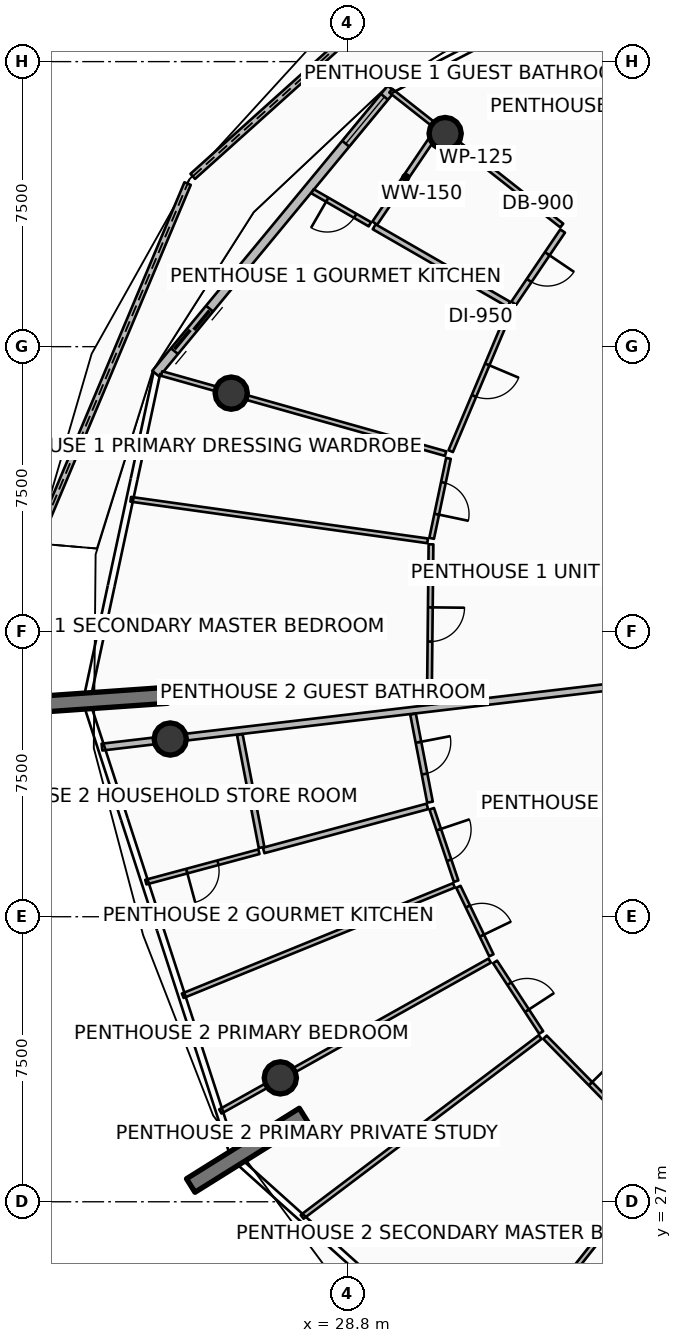
"""IFC4 building model, lengths in metres.
Left out: names, types, materials, properties, quantities, classifications, styles, units other than length and angle.
Written with IfcOpenShell. Run it as: python <this file> out.ifc"""

import sys

from ifc_helpers import new_model, si_unit, direction, frame, frame_2d, origin, origin_2d, place, context, subcontext, project, spatial, polyline, rectangle, circle, outline, extrude, element, fill, save


model = new_model("IFC4")
c1 = context("Model", 3, precision=1e-05, world=origin(), true_north=direction((0.0, 1.0)))
c2 = subcontext(c1, "Body", "Model", "MODEL_VIEW")
j1 = project(units=[si_unit("LENGTHUNIT", "METRE"), si_unit("PLANEANGLEUNIT", "RADIAN")], contexts=[c1])
p1 = place(None, origin())
s1 = spatial("IfcSite", under=j1, at=p1, CompositionType="ELEMENT")
p2 = place(p1, origin())
s2 = spatial("IfcBuilding", under=s1, at=p2, CompositionType="ELEMENT")
p3 = place(p2, frame((0.0, 0.0, 338.9)))
s3 = spatial("IfcBuildingStorey", under=s2, at=p3, CompositionType="ELEMENT", Elevation=338.9)
for number, where, z_axis, x_axis in (
    (1, (24.059, 40.326, 0.0), (0.0, 0.0, 1.0), (-0.998, -0.07, 0.0)),
    (2, (27.647, 29.282, 0.0), (0.0, 0.0, 1.0), (-0.848, -0.53, 0.0)),
):
    element("IfcWall", number, at=place(p3, frame(where, z_axis=z_axis, x_axis=x_axis)), inside=s3, PredefinedType="SOLIDWALL", context=c2, shape_type="SweptSolid", body=[
        extrude(rectangle(XDim=3.5, YDim=0.42, at=frame_2d((1.75, 0.0))), origin(), (0.0, 0.0, 1.0), 4.2),
    ])
for number, where, z_axis, x_axis in (
    (3, (31.374, 55.107, 0.0), (0.0, 0.0, 1.0), (1.0, 0.0, 0.0)),
    (4, (25.744, 48.277, 0.0), (0.0, 0.0, 1.0), (1.0, 0.0, 0.0)),
    (5, (24.14, 39.176, 0.0), (0.0, 0.0, 1.0), (1.0, 0.0, 0.0)),
    (6, (27.037, 30.26, 0.0), (0.0, 0.0, 1.0), (1.0, 0.0, 0.0)),
):
    element("IfcColumn", number, at=place(p3, frame(where, z_axis=z_axis, x_axis=x_axis)), inside=s3, PredefinedType="COLUMN", context=c2, shape_type="SweptSolid", body=[
        extrude(circle(Radius=0.425, at=origin_2d()), origin(), (0.0, 0.0, 1.0), 3.8),
    ])
p4 = place(p3, frame((31.997, 60.507, 0.0), z_axis=(0.0, 0.0, 1.0), x_axis=(-0.74390919155, -0.668280715514, 0.0)))
e7 = element("IfcWall", 7, at=p4, inside=s3, PredefinedType="PARAPET", context=c2, shape_type="SweptSolid", body=[
    extrude(outline(polyline([(0.0, 0.0), (9.765, 0.0), (9.765, 1.348), (4.883, 1.562), (0.0, 1.747), (0.0, 0.0)])), frame((0.0, 0.09, 0.0), z_axis=(0.0, -1.0, 0.0), x_axis=(1.0, 0.0, 0.0)), (0.0, 0.0, 1.0), 0.18),
])
p5 = place(p3, frame((24.597, 53.79, 0.0), z_axis=(0.0, 0.0, 1.0), x_axis=(-0.38743619069, -0.921896522471, 0.0)))
e8 = element("IfcWall", 8, at=p5, inside=s3, PredefinedType="PARAPET", context=c2, shape_type="SweptSolid", body=[
    extrude(outline(polyline([(0.0, 0.0), (10.269, 0.0), (10.269, 1.12), (5.135, 1.182), (0.0, 1.348), (0.0, 0.0)])), frame((0.0, 0.09, 0.0), z_axis=(0.0, -1.0, 0.0), x_axis=(1.0, 0.0, 0.0)), (0.0, 0.0, 1.0), 0.18),
])
p6 = place(p3, frame((29.955, 56.289, 0.0), z_axis=(0.0, 0.0, 1.0), x_axis=(-0.636803612721, -0.771026042897, 0.0)))
e9 = element("IfcWall", 9, at=p6, inside=s3, PredefinedType="SOLIDWALL", context=c2, shape_type="SweptSolid", body=[
    extrude(rectangle(XDim=9.728, YDim=0.24, at=frame_2d((4.864, 0.0))), origin(), (0.0, 0.0, 1.0), 2.75),
])
p7 = place(p6, frame((7.508, 0.0, 0.0)))
e10 = element("IfcOpeningElement", 10, at=p7, cuts=e9, PredefinedType="OPENING", context=c2, shape_type="SweptSolid", body=[
    extrude(rectangle(XDim=1.45, YDim=2.15, at=frame_2d((0.725, 1.075))), frame((0.0, 0.13, 0.0), z_axis=(0.0, -1.0, 0.0), x_axis=(1.0, 0.0, 0.0)), (0.0, 0.0, 1.0), 0.26),
])
p8 = place(p6, frame((0.28, 0.0, 0.65)))
e11 = element("IfcOpeningElement", 11, at=p8, cuts=e9, PredefinedType="OPENING", context=c2, shape_type="SweptSolid", body=[
    extrude(rectangle(XDim=1.6, YDim=1.5, at=frame_2d((0.8, 0.75))), frame((0.0, 0.13, 0.0), z_axis=(0.0, -1.0, 0.0), x_axis=(1.0, 0.0, 0.0)), (0.0, 0.0, 1.0), 0.26),
])
p9 = place(p3, frame((37.191, 40.721, 0.0), z_axis=(0.0, 0.0, 1.0), x_axis=(-0.993068548333, -0.117536625409, 0.0)))
e12 = element("IfcWall", 12, at=p9, inside=s3, PredefinedType="PARTITIONING", context=c2, shape_type="SweptSolid", body=[
    extrude(rectangle(XDim=14.951, YDim=0.18, at=frame_2d((7.476, 0.0))), origin(), (0.0, 0.0, 1.0), 3.24),
])
p10 = place(p3, frame((34.443, 52.688, 0.0), z_axis=(0.0, 0.0, 1.0), x_axis=(-0.785329715116, 0.61907773224, 0.0)))
e13 = element("IfcWall", 13, at=p10, inside=s3, PredefinedType="PARTITIONING", context=c2, shape_type="SweptSolid", body=[
    extrude(rectangle(XDim=5.73, YDim=0.125, at=frame_2d((2.865, 0.0))), origin(), (0.0, 0.0, 1.0), 3.24),
])
p11 = place(p3, frame((34.466, 52.543, 0.0), z_axis=(0.0, 0.0, 1.0), x_axis=(-0.560627016922, -0.828068443969, 0.0)))
e14 = element("IfcWall", 14, at=p11, inside=s3, PredefinedType="PARTITIONING", context=c2, shape_type="SweptSolid", body=[
    extrude(rectangle(XDim=2.295, YDim=0.15, at=frame_2d((1.147, 0.0))), origin(), (0.0, 0.0, 1.0), 3.24),
])
p12 = place(p11, frame((0.722, 0.0, 0.0)))
e15 = element("IfcOpeningElement", 15, at=p12, cuts=e14, PredefinedType="OPENING", context=c2, shape_type="SweptSolid", body=[
    extrude(rectangle(XDim=0.85, YDim=2.06, at=frame_2d((0.425, 1.03))), frame((0.0, 0.085, 0.0), z_axis=(0.0, -1.0, 0.0), x_axis=(1.0, 0.0, 0.0)), (0.0, 0.0, 1.0), 0.17),
])
p13 = place(p3, frame((31.152, 55.155, 0.0), z_axis=(0.0, 0.0, 1.0), x_axis=(-0.560638207203, -0.828060867705, 0.0)))
e16 = element("IfcWall", 16, at=p13, inside=s3, PredefinedType="PARTITIONING", context=c2, shape_type="SweptSolid", body=[
    extrude(rectangle(XDim=2.906, YDim=0.15, at=frame_2d((1.453, 0.0))), origin(), (0.0, 0.0, 1.0), 3.24),
])
p14 = place(p3, frame((33.051, 50.613, 0.0), z_axis=(0.0, 0.0, 1.0), x_axis=(-0.866485544891, 0.499202163952, 0.0)))
e17 = element("IfcWall", 17, at=p14, inside=s3, PredefinedType="PARTITIONING", context=c2, shape_type="SweptSolid", body=[
    extrude(rectangle(XDim=4.09, YDim=0.15, at=frame_2d((2.045, 0.0))), origin(), (0.0, 0.0, 1.0), 3.24),
])
p15 = place(p3, frame((29.394, 52.719, 0.0), z_axis=(0.0, 0.0, 1.0), x_axis=(-0.866486493133, 0.499200518047, 0.0)))
e18 = element("IfcWall", 18, at=p15, inside=s3, PredefinedType="PARTITIONING", context=c2, shape_type="SweptSolid", body=[
    extrude(rectangle(XDim=1.741, YDim=0.125, at=frame_2d((0.871, 0.0))), origin(), (0.0, 0.0, 1.0), 3.24),
])
p16 = place(p15, frame((0.446, 0.0, 0.0)))
e19 = element("IfcOpeningElement", 19, at=p16, cuts=e18, PredefinedType="OPENING", context=c2, shape_type="SweptSolid", body=[
    extrude(rectangle(XDim=0.85, YDim=2.06, at=frame_2d((0.425, 1.03))), frame((0.0, 0.073, 0.0), z_axis=(0.0, -1.0, 0.0), x_axis=(1.0, 0.0, 0.0)), (0.0, 0.0, 1.0), 0.145),
])
p17 = place(p3, frame((33.094, 50.485, 0.0), z_axis=(0.0, 0.0, 1.0), x_axis=(-0.388261704365, -0.921549157085, 0.0)))
e20 = element("IfcWall", 20, at=p17, inside=s3, PredefinedType="PARTITIONING", context=c2, shape_type="SweptSolid", body=[
    extrude(rectangle(XDim=4.052, YDim=0.125, at=frame_2d((2.026, 0.0))), origin(), (0.0, 0.0, 1.0), 3.24),
])
p18 = place(p17, frame((1.576, 0.0, 0.0)))
e21 = element("IfcOpeningElement", 21, at=p18, cuts=e20, PredefinedType="OPENING", context=c2, shape_type="SweptSolid", body=[
    extrude(rectangle(XDim=0.9, YDim=2.08, at=frame_2d((0.45, 1.04))), frame((0.0, 0.073, 0.0), z_axis=(0.0, -1.0, 0.0), x_axis=(1.0, 0.0, 0.0)), (0.0, 0.0, 1.0), 0.145),
])
p19 = place(p3, frame((31.385, 46.686, 0.0), z_axis=(0.0, 0.0, 1.0), x_axis=(-0.962455784847, 0.271438505401, 0.0)))
e22 = element("IfcWall", 22, at=p19, inside=s3, PredefinedType="PARTITIONING", context=c2, shape_type="SweptSolid", body=[
    extrude(rectangle(XDim=7.764, YDim=0.125, at=frame_2d((3.882, 0.0))), origin(), (0.0, 0.0, 1.0), 3.24),
])
p20 = place(p3, frame((30.914, 44.391, 0.0), z_axis=(0.0, 0.0, 1.0), x_axis=(-0.990350838179, 0.138582889702, 0.0)))
e23 = element("IfcWall", 23, at=p20, inside=s3, PredefinedType="PARTITIONING", context=c2, shape_type="SweptSolid", body=[
    extrude(rectangle(XDim=7.889, YDim=0.125, at=frame_2d((3.944, 0.0))), origin(), (0.0, 0.0, 1.0), 3.24),
])
p21 = place(p3, frame((31.461, 46.561, 0.0), z_axis=(0.0, 0.0, 1.0), x_axis=(-0.205518321788, -0.978653268226, 0.0)))
e24 = element("IfcWall", 24, at=p21, inside=s3, PredefinedType="PARTITIONING", context=c2, shape_type="SweptSolid", body=[
    extrude(rectangle(XDim=2.15, YDim=0.125, at=frame_2d((1.075, 0.0))), origin(), (0.0, 0.0, 1.0), 3.24),
])
p22 = place(p21, frame((0.65, 0.0, 0.0)))
e25 = element("IfcOpeningElement", 25, at=p22, cuts=e24, PredefinedType="OPENING", context=c2, shape_type="SweptSolid", body=[
    extrude(rectangle(XDim=0.85, YDim=2.06, at=frame_2d((0.425, 1.03))), frame((0.0, 0.073, 0.0), z_axis=(0.0, -1.0, 0.0), x_axis=(1.0, 0.0, 0.0)), (0.0, 0.0, 1.0), 0.145),
])
p23 = place(p3, frame((31.002, 44.298, 0.0), z_axis=(0.0, 0.0, 1.0), x_axis=(-0.010598269554, -0.999943836764, 0.0)))
e26 = element("IfcWall", 26, at=p23, inside=s3, PredefinedType="PARTITIONING", context=c2, shape_type="SweptSolid", body=[
    extrude(rectangle(XDim=4.216, YDim=0.125, at=frame_2d((2.108, 0.0))), origin(), (0.0, 0.0, 1.0), 3.24),
])
p24 = place(p23, frame((1.658, 0.0, 0.0)))
e27 = element("IfcOpeningElement", 27, at=p24, cuts=e26, PredefinedType="OPENING", context=c2, shape_type="SweptSolid", body=[
    extrude(rectangle(XDim=0.9, YDim=2.08, at=frame_2d((0.45, 1.04))), frame((0.0, 0.073, 0.0), z_axis=(0.0, -1.0, 0.0), x_axis=(1.0, 0.0, 0.0)), (0.0, 0.0, 1.0), 0.145),
])
p25 = place(p3, frame((30.529, 39.832, 0.0), z_axis=(0.0, 0.0, 1.0), x_axis=(0.189108301743, -0.981956236404, 0.0)))
e28 = element("IfcWall", 28, at=p25, inside=s3, PredefinedType="PARTITIONING", context=c2, shape_type="SweptSolid", body=[
    extrude(rectangle(XDim=2.36, YDim=0.15, at=frame_2d((1.18, 0.0))), origin(), (0.0, 0.0, 1.0), 3.24),
])
p26 = place(p25, frame((0.755, 0.0, 0.0)))
e29 = element("IfcOpeningElement", 29, at=p26, cuts=e28, PredefinedType="OPENING", context=c2, shape_type="SweptSolid", body=[
    extrude(rectangle(XDim=0.85, YDim=2.06, at=frame_2d((0.425, 1.03))), frame((0.0, 0.085, 0.0), z_axis=(0.0, -1.0, 0.0), x_axis=(1.0, 0.0, 0.0)), (0.0, 0.0, 1.0), 0.17),
])
p27 = place(p3, frame((25.971, 39.292, 0.0), z_axis=(0.0, 0.0, 1.0), x_axis=(0.189140808358, -0.981949975617, 0.0)))
e30 = element("IfcWall", 30, at=p27, inside=s3, PredefinedType="PARTITIONING", context=c2, shape_type="SweptSolid", body=[
    extrude(rectangle(XDim=3.024, YDim=0.15, at=frame_2d((1.512, 0.0))), origin(), (0.0, 0.0, 1.0), 3.24),
])
p28 = place(p3, frame((30.906, 37.403, 0.0), z_axis=(0.0, 0.0, 1.0), x_axis=(-0.96569498994, -0.259679006477, 0.0)))
e31 = element("IfcWall", 31, at=p28, inside=s3, PredefinedType="PARTITIONING", context=c2, shape_type="SweptSolid", body=[
    extrude(rectangle(XDim=4.46, YDim=0.15, at=frame_2d((2.23, 0.0))), origin(), (0.0, 0.0, 1.0), 3.24),
])
p29 = place(p3, frame((26.473, 36.211, 0.0), z_axis=(0.0, 0.0, 1.0), x_axis=(-0.965686885268, -0.259709144278, 0.0)))
e32 = element("IfcWall", 32, at=p29, inside=s3, PredefinedType="PARTITIONING", context=c2, shape_type="SweptSolid", body=[
    extrude(rectangle(XDim=3.081, YDim=0.125, at=frame_2d((1.54, 0.0))), origin(), (0.0, 0.0, 1.0), 3.24),
])
p30 = place(p29, frame((1.115, 0.0, 0.0)))
e33 = element("IfcOpeningElement", 33, at=p30, cuts=e32, PredefinedType="OPENING", context=c2, shape_type="SweptSolid", body=[
    extrude(rectangle(XDim=0.85, YDim=2.06, at=frame_2d((0.425, 1.03))), frame((0.0, 0.073, 0.0), z_axis=(0.0, -1.0, 0.0), x_axis=(1.0, 0.0, 0.0)), (0.0, 0.0, 1.0), 0.145),
])
p31 = place(p3, frame((31.604, 35.325, 0.0), z_axis=(0.0, 0.0, 1.0), x_axis=(-0.926197317487, -0.377039161202, 0.0)))
e34 = element("IfcWall", 34, at=p31, inside=s3, PredefinedType="PARTITIONING", context=c2, shape_type="SweptSolid", body=[
    extrude(rectangle(XDim=7.704, YDim=0.125, at=frame_2d((3.852, 0.0))), origin(), (0.0, 0.0, 1.0), 3.24),
])
p32 = place(p3, frame((31.021, 37.341, 0.0), z_axis=(0.0, 0.0, 1.0), x_axis=(0.318958301795, -0.947768749071, 0.0)))
e35 = element("IfcWall", 35, at=p32, inside=s3, PredefinedType="PARTITIONING", context=c2, shape_type="SweptSolid", body=[
    extrude(rectangle(XDim=2.011, YDim=0.125, at=frame_2d((1.005, 0.0))), origin(), (0.0, 0.0, 1.0), 3.24),
])
p33 = place(p32, frame((0.58, 0.0, 0.0)))
e36 = element("IfcOpeningElement", 36, at=p33, cuts=e35, PredefinedType="OPENING", context=c2, shape_type="SweptSolid", body=[
    extrude(rectangle(XDim=0.85, YDim=2.06, at=frame_2d((0.425, 1.03))), frame((0.0, 0.073, 0.0), z_axis=(0.0, -1.0, 0.0), x_axis=(1.0, 0.0, 0.0)), (0.0, 0.0, 1.0), 0.145),
])
p34 = place(p3, frame((31.723, 35.287, 0.0), z_axis=(0.0, 0.0, 1.0), x_axis=(0.433639468752, -0.901086461523, 0.0)))
e37 = element("IfcWall", 37, at=p34, inside=s3, PredefinedType="PARTITIONING", context=c2, shape_type="SweptSolid", body=[
    extrude(rectangle(XDim=2.0, YDim=0.125, at=frame_2d((1.0, 0.0))), origin(), (0.0, 0.0, 1.0), 3.24),
])
p35 = place(p34, frame((0.575, 0.0, 0.0)))
e38 = element("IfcOpeningElement", 38, at=p35, cuts=e37, PredefinedType="OPENING", context=c2, shape_type="SweptSolid", body=[
    extrude(rectangle(XDim=0.85, YDim=2.06, at=frame_2d((0.425, 1.03))), frame((0.0, 0.073, 0.0), z_axis=(0.0, -1.0, 0.0), x_axis=(1.0, 0.0, 0.0)), (0.0, 0.0, 1.0), 0.145),
])
p36 = place(p3, frame((32.546, 33.345, 0.0), z_axis=(0.0, 0.0, 1.0), x_axis=(-0.87250499099, -0.488605199212, 0.0)))
e39 = element("IfcWall", 39, at=p36, inside=s3, PredefinedType="PARTITIONING", context=c2, shape_type="SweptSolid", body=[
    extrude(rectangle(XDim=8.124, YDim=0.125, at=frame_2d((4.062, 0.0))), origin(), (0.0, 0.0, 1.0), 3.24),
])
p37 = place(p3, frame((37.035, 28.091, 0.0), z_axis=(0.0, 0.0, 1.0), x_axis=(-0.619085814128, -0.785323344072, 0.0)))
e40 = element("IfcWall", 40, at=p37, inside=s3, PredefinedType="PARTITIONING", context=c2, shape_type="SweptSolid", body=[
    extrude(rectangle(XDim=7.415, YDim=0.125, at=frame_2d((3.708, 0.0))), origin(), (0.0, 0.0, 1.0), 3.24),
])
p38 = place(p3, frame((33.873, 31.333, 0.0), z_axis=(0.0, 0.0, 1.0), x_axis=(-0.798020912915, -0.602629755779, 0.0)))
e41 = element("IfcWall", 41, at=p38, inside=s3, PredefinedType="PARTITIONING", context=c2, shape_type="SweptSolid", body=[
    extrude(rectangle(XDim=7.848, YDim=0.125, at=frame_2d((3.924, 0.0))), origin(), (0.0, 0.0, 1.0), 3.24),
])
p39 = place(p3, frame((32.688, 33.311, 0.0), z_axis=(0.0, 0.0, 1.0), x_axis=(0.546878647358, -0.837211887794, 0.0)))
e42 = element("IfcWall", 42, at=p39, inside=s3, PredefinedType="PARTITIONING", context=c2, shape_type="SweptSolid", body=[
    extrude(rectangle(XDim=2.218, YDim=0.125, at=frame_2d((1.109, 0.0))), origin(), (0.0, 0.0, 1.0), 3.24),
])
p40 = place(p39, frame((0.684, 0.0, 0.0)))
e43 = element("IfcOpeningElement", 43, at=p40, cuts=e42, PredefinedType="OPENING", context=c2, shape_type="SweptSolid", body=[
    extrude(rectangle(XDim=0.85, YDim=2.06, at=frame_2d((0.425, 1.03))), frame((0.0, 0.073, 0.0), z_axis=(0.0, -1.0, 0.0), x_axis=(1.0, 0.0, 0.0)), (0.0, 0.0, 1.0), 0.145),
])
p41 = place(p3, frame((34.001, 31.33, 0.0), z_axis=(0.0, 0.0, 1.0), x_axis=(0.699699856998, -0.714436918221, 0.0)))
e44 = element("IfcWall", 44, at=p41, inside=s3, PredefinedType="PARTITIONING", context=c2, shape_type="SweptSolid", body=[
    extrude(rectangle(XDim=4.324, YDim=0.125, at=frame_2d((2.162, 0.0))), origin(), (0.0, 0.0, 1.0), 3.24),
])
p42 = place(p41, frame((1.712, 0.0, 0.0)))
e45 = element("IfcOpeningElement", 45, at=p42, cuts=e44, PredefinedType="OPENING", context=c2, shape_type="SweptSolid", body=[
    extrude(rectangle(XDim=0.9, YDim=2.08, at=frame_2d((0.45, 1.04))), frame((0.0, 0.073, 0.0), z_axis=(0.0, -1.0, 0.0), x_axis=(1.0, 0.0, 0.0)), (0.0, 0.0, 1.0), 0.145),
])
p43 = place(p7, origin())
e46 = element("IfcDoor", 46, at=p43, inside=s3, OperationType="DOUBLE_DOOR_SLIDING", PredefinedType="DOOR", context=c2, shape_type="SweptSolid", body=[
    extrude(rectangle(XDim=1.45, YDim=2.15, at=frame_2d((0.725, 1.075))), frame((0.0, 0.025, 0.0), z_axis=(0.0, -1.0, 0.0), x_axis=(1.0, 0.0, 0.0)), (0.0, 0.0, 1.0), 0.05),
])
fill(e10, e46)
p44 = place(p8, origin())
e47 = element("IfcWindow", 47, at=p44, inside=s3, PartitioningType="SINGLE_PANEL", PredefinedType="WINDOW", context=c2, shape_type="SweptSolid", body=[
    extrude(rectangle(XDim=1.6, YDim=1.5, at=frame_2d((0.8, 0.75))), frame((0.0, 0.03, 0.0), z_axis=(0.0, -1.0, 0.0), x_axis=(1.0, 0.0, 0.0)), (0.0, 0.0, 1.0), 0.06),
])
fill(e11, e47)
p45 = place(p12, origin())
e48 = element("IfcDoor", 48, at=p45, inside=s3, OperationType="SINGLE_SWING_LEFT", PredefinedType="DOOR", context=c2, shape_type="SweptSolid", body=[
    extrude(rectangle(XDim=0.85, YDim=2.06, at=frame_2d((0.425, 1.03))), frame((0.0, 0.025, 0.0), z_axis=(0.0, -1.0, 0.0), x_axis=(1.0, 0.0, 0.0)), (0.0, 0.0, 1.0), 0.05),
])
fill(e15, e48)
p46 = place(p16, origin())
e49 = element("IfcDoor", 49, at=p46, inside=s3, OperationType="SINGLE_SWING_RIGHT", PredefinedType="DOOR", context=c2, shape_type="SweptSolid", body=[
    extrude(rectangle(XDim=0.85, YDim=2.06, at=frame_2d((0.425, 1.03))), frame((0.0, 0.025, 0.0), z_axis=(0.0, -1.0, 0.0), x_axis=(1.0, 0.0, 0.0)), (0.0, 0.0, 1.0), 0.05),
])
fill(e19, e49)
p47 = place(p18, origin())
e50 = element("IfcDoor", 50, at=p47, inside=s3, OperationType="SINGLE_SWING_LEFT", PredefinedType="DOOR", context=c2, shape_type="SweptSolid", body=[
    extrude(rectangle(XDim=0.9, YDim=2.08, at=frame_2d((0.45, 1.04))), frame((0.0, 0.025, 0.0), z_axis=(0.0, -1.0, 0.0), x_axis=(1.0, 0.0, 0.0)), (0.0, 0.0, 1.0), 0.05),
])
fill(e21, e50)
p48 = place(p22, origin())
e51 = element("IfcDoor", 51, at=p48, inside=s3, OperationType="SINGLE_SWING_RIGHT", PredefinedType="DOOR", context=c2, shape_type="SweptSolid", body=[
    extrude(rectangle(XDim=0.85, YDim=2.06, at=frame_2d((0.425, 1.03))), frame((0.0, 0.025, 0.0), z_axis=(0.0, -1.0, 0.0), x_axis=(1.0, 0.0, 0.0)), (0.0, 0.0, 1.0), 0.05),
])
fill(e25, e51)
p49 = place(p24, origin())
e52 = element("IfcDoor", 52, at=p49, inside=s3, OperationType="SINGLE_SWING_LEFT", PredefinedType="DOOR", context=c2, shape_type="SweptSolid", body=[
    extrude(rectangle(XDim=0.9, YDim=2.08, at=frame_2d((0.45, 1.04))), frame((0.0, 0.025, 0.0), z_axis=(0.0, -1.0, 0.0), x_axis=(1.0, 0.0, 0.0)), (0.0, 0.0, 1.0), 0.05),
])
fill(e27, e52)
p50 = place(p26, origin())
e53 = element("IfcDoor", 53, at=p50, inside=s3, OperationType="SINGLE_SWING_LEFT", PredefinedType="DOOR", context=c2, shape_type="SweptSolid", body=[
    extrude(rectangle(XDim=0.85, YDim=2.06, at=frame_2d((0.425, 1.03))), frame((0.0, 0.025, 0.0), z_axis=(0.0, -1.0, 0.0), x_axis=(1.0, 0.0, 0.0)), (0.0, 0.0, 1.0), 0.05),
])
fill(e29, e53)
p51 = place(p30, origin())
e54 = element("IfcDoor", 54, at=p51, inside=s3, OperationType="SINGLE_SWING_RIGHT", PredefinedType="DOOR", context=c2, shape_type="SweptSolid", body=[
    extrude(rectangle(XDim=0.85, YDim=2.06, at=frame_2d((0.425, 1.03))), frame((0.0, 0.025, 0.0), z_axis=(0.0, -1.0, 0.0), x_axis=(1.0, 0.0, 0.0)), (0.0, 0.0, 1.0), 0.05),
])
fill(e33, e54)
p52 = place(p33, origin())
e55 = element("IfcDoor", 55, at=p52, inside=s3, OperationType="SINGLE_SWING_LEFT", PredefinedType="DOOR", context=c2, shape_type="SweptSolid", body=[
    extrude(rectangle(XDim=0.85, YDim=2.06, at=frame_2d((0.425, 1.03))), frame((0.0, 0.025, 0.0), z_axis=(0.0, -1.0, 0.0), x_axis=(1.0, 0.0, 0.0)), (0.0, 0.0, 1.0), 0.05),
])
fill(e36, e55)
p53 = place(p35, origin())
e56 = element("IfcDoor", 56, at=p53, inside=s3, OperationType="SINGLE_SWING_RIGHT", PredefinedType="DOOR", context=c2, shape_type="SweptSolid", body=[
    extrude(rectangle(XDim=0.85, YDim=2.06, at=frame_2d((0.425, 1.03))), frame((0.0, 0.025, 0.0), z_axis=(0.0, -1.0, 0.0), x_axis=(1.0, 0.0, 0.0)), (0.0, 0.0, 1.0), 0.05),
])
fill(e38, e56)
p54 = place(p40, origin())
e57 = element("IfcDoor", 57, at=p54, inside=s3, OperationType="SINGLE_SWING_RIGHT", PredefinedType="DOOR", context=c2, shape_type="SweptSolid", body=[
    extrude(rectangle(XDim=0.85, YDim=2.06, at=frame_2d((0.425, 1.03))), frame((0.0, 0.025, 0.0), z_axis=(0.0, -1.0, 0.0), x_axis=(1.0, 0.0, 0.0)), (0.0, 0.0, 1.0), 0.05),
])
fill(e43, e57)
p55 = place(p42, origin())
e58 = element("IfcDoor", 58, at=p55, inside=s3, OperationType="SINGLE_SWING_LEFT", PredefinedType="DOOR", context=c2, shape_type="SweptSolid", body=[
    extrude(rectangle(XDim=0.9, YDim=2.08, at=frame_2d((0.45, 1.04))), frame((0.0, 0.025, 0.0), z_axis=(0.0, -1.0, 0.0), x_axis=(1.0, 0.0, 0.0)), (0.0, 0.0, 1.0), 0.05),
])
fill(e45, e58)
save(model, sys.argv[1])
